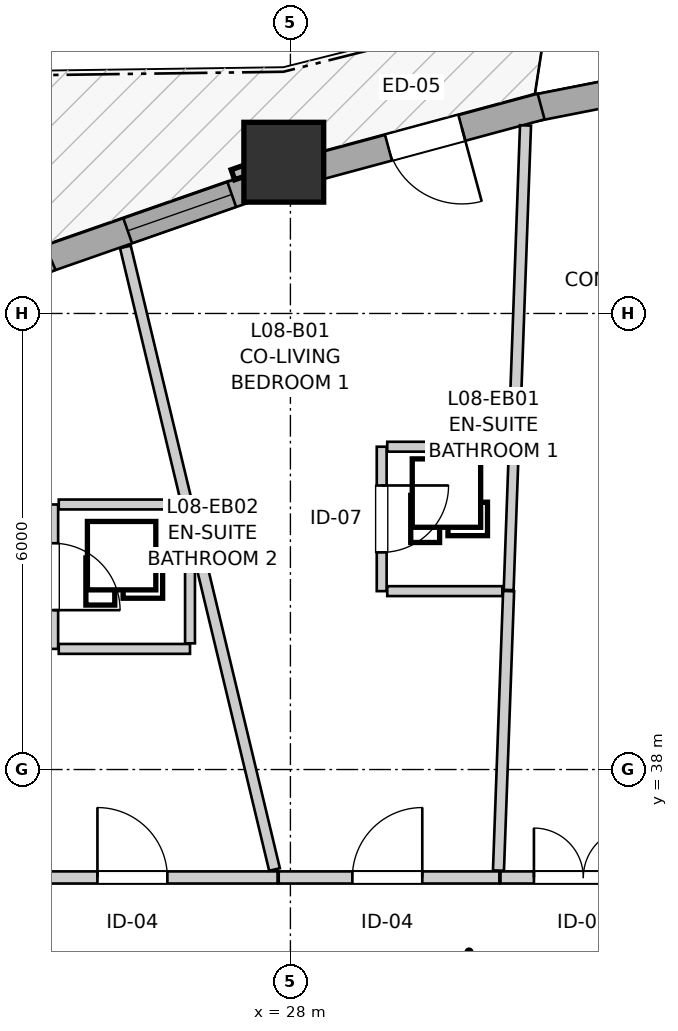
"""IFC4 building model, lengths in metres.
Left out: names, types, materials, properties, quantities, classifications, styles, units other than length and angle.
Written with IfcOpenShell. Run it as: python <this file> out.ifc"""

import sys

from ifc_helpers import new_model, si_unit, direction, frame, frame_2d, origin, origin_2d, place, context, subcontext, project, spatial, rectangle, extrude, source, transform, mapped, element, fill, save


model = new_model("IFC4")
c1 = context("Model", 3, precision=1e-05, world=origin(), true_north=direction((0.0, 1.0)))
c2 = subcontext(c1, "Body", "Model", "MODEL_VIEW")
j1 = project(units=[si_unit("LENGTHUNIT", "METRE"), si_unit("PLANEANGLEUNIT", "RADIAN")], contexts=[c1])
p1 = place(None, origin())
s1 = spatial("IfcSite", under=j1, at=p1, CompositionType="ELEMENT")
p2 = place(p1, origin())
s2 = spatial("IfcBuilding", under=s1, at=p2, CompositionType="ELEMENT")
p3 = place(p2, frame((0.0, 0.0, 30.2)))
s3 = spatial("IfcBuildingStorey", under=s2, at=p3, CompositionType="ELEMENT", Elevation=30.2)
m1 = source(origin(), c2, "Body", "SweptSolid", [
    extrude(rectangle(XDim=1.05, YDim=1.05, at=origin_2d()), origin(), (0.0, 0.0, 1.0), 2.935),
])
p4 = place(p3, frame((27.913, 45.99, 0.0), z_axis=(0.0, 0.0, 1.0), x_axis=(1.0, 0.0, 0.0)))
e1 = element("IfcColumn", 1, at=p4, inside=s3, PredefinedType="COLUMN", context=c2, shape_type="MappedRepresentation", body=[
    mapped(m1, transform((0.0, 0.0, 0.0), x_axis=(1.0, 0.0, 0.0), y_axis=(0.0, 1.0, 0.0), z_axis=(0.0, 0.0, 1.0), scale=1.0)),
])
p5 = place(p3, frame((34.659, 47.38, 0.0), z_axis=(0.0, 0.0, 1.0), x_axis=(-0.981222284826, -0.19288034571, 0.0)))
e2 = element("IfcWall", 2, at=p5, inside=s3, PredefinedType="SOLIDWALL", context=c2, shape_type="SweptSolid", body=[
    extrude(rectangle(XDim=3.512, YDim=0.35, at=frame_2d((1.756, 0.0))), origin(), (0.0, 0.0, 1.0), 2.415),
])
p6 = place(p5, frame((1.021, 0.0, 0.82)))
e3 = element("IfcOpeningElement", 3, at=p6, cuts=e2, PredefinedType="OPENING", context=c2, shape_type="SweptSolid", body=[
    extrude(rectangle(XDim=1.45, YDim=1.25, at=frame_2d((0.725, 0.625))), frame((0.0, 0.185, 0.0), z_axis=(0.0, -1.0, 0.0), x_axis=(1.0, 0.0, 0.0)), (0.0, 0.0, 1.0), 0.37),
])
p7 = place(p3, frame((31.298, 46.722, 0.0), z_axis=(0.0, 0.0, 1.0), x_axis=(-0.965455913242, -0.260566459057, 0.0)))
e4 = element("IfcWall", 4, at=p7, inside=s3, PredefinedType="SOLIDWALL", context=c2, shape_type="SweptSolid", body=[
    extrude(rectangle(XDim=3.159, YDim=0.35, at=frame_2d((1.58, 0.0))), origin(), (0.0, 0.0, 1.0), 2.415),
])
p8 = place(p7, frame((1.08, 0.0, 0.0)))
e5 = element("IfcOpeningElement", 5, at=p8, cuts=e4, PredefinedType="OPENING", context=c2, shape_type="SweptSolid", body=[
    extrude(rectangle(XDim=1.0, YDim=2.1, at=frame_2d((0.5, 1.05))), frame((0.0, 0.185, 0.0), z_axis=(0.0, -1.0, 0.0), x_axis=(1.0, 0.0, 0.0)), (0.0, 0.0, 1.0), 0.37),
])
p9 = place(p3, frame((27.687, 45.726, 0.0), z_axis=(0.0, 0.0, 1.0), x_axis=(-0.9441205041, -0.329600475936, 0.0)))
e6 = element("IfcWall", 6, at=p9, inside=s3, PredefinedType="SOLIDWALL", context=c2, shape_type="SweptSolid", body=[
    extrude(rectangle(XDim=3.104, YDim=0.35, at=frame_2d((1.552, 0.0))), origin(), (0.0, 0.0, 1.0), 2.415),
])
p10 = place(p9, frame((0.486, 0.0, 0.82)))
e7 = element("IfcOpeningElement", 7, at=p10, cuts=e6, PredefinedType="OPENING", context=c2, shape_type="SweptSolid", body=[
    extrude(rectangle(XDim=1.45, YDim=1.25, at=frame_2d((0.725, 0.625))), frame((0.0, 0.185, 0.0), z_axis=(0.0, -1.0, 0.0), x_axis=(1.0, 0.0, 0.0)), (0.0, 0.0, 1.0), 0.37),
])
p11 = place(p3, frame((24.84, 44.735, 0.0), z_axis=(0.0, 0.0, 1.0), x_axis=(-0.917090935142, -0.398678086532, 0.0)))
e8 = element("IfcWall", 8, at=p11, inside=s3, PredefinedType="SOLIDWALL", context=c2, shape_type="SweptSolid", body=[
    extrude(rectangle(XDim=3.346, YDim=0.35, at=frame_2d((1.673, 0.0))), origin(), (0.0, 0.0, 1.0), 2.415),
])
p12 = place(p11, frame((1.108, 0.0, 0.82)))
e9 = element("IfcOpeningElement", 9, at=p12, cuts=e8, PredefinedType="OPENING", context=c2, shape_type="SweptSolid", body=[
    extrude(rectangle(XDim=1.15, YDim=1.2, at=frame_2d((0.575, 0.6))), frame((0.0, 0.185, 0.0), z_axis=(0.0, -1.0, 0.0), x_axis=(1.0, 0.0, 0.0)), (0.0, 0.0, 1.0), 0.37),
])
p13 = place(p3, frame((24.009, 36.58, 0.0), z_axis=(0.0, 0.0, 1.0), x_axis=(1.0, 0.0, 0.0)))
e10 = element("IfcWall", 10, at=p13, inside=s3, PredefinedType="PARTITIONING", context=c2, shape_type="SweptSolid", body=[
    extrude(rectangle(XDim=3.822, YDim=0.16, at=frame_2d((1.911, 0.0))), origin(), (0.0, 0.0, 1.0), 2.543),
])
p14 = place(p13, frame((1.452, 0.0, 0.0)))
e11 = element("IfcOpeningElement", 11, at=p14, cuts=e10, PredefinedType="OPENING", context=c2, shape_type="SweptSolid", body=[
    extrude(rectangle(XDim=0.92, YDim=2.1, at=frame_2d((0.46, 1.05))), frame((0.0, 0.09, 0.0), z_axis=(0.0, -1.0, 0.0), x_axis=(1.0, 0.0, 0.0)), (0.0, 0.0, 1.0), 0.18),
])
p15 = place(p3, frame((27.846, 36.58, 0.0), z_axis=(0.0, 0.0, 1.0), x_axis=(1.0, 0.0, 0.0)))
e12 = element("IfcWall", 12, at=p15, inside=s3, PredefinedType="PARTITIONING", context=c2, shape_type="SweptSolid", body=[
    extrude(rectangle(XDim=2.903, YDim=0.16, at=frame_2d((1.452, 0.0))), origin(), (0.0, 0.0, 1.0), 2.935),
])
p16 = place(p15, frame((0.969, 0.0, 0.0)))
e13 = element("IfcOpeningElement", 13, at=p16, cuts=e12, PredefinedType="OPENING", context=c2, shape_type="SweptSolid", body=[
    extrude(rectangle(XDim=0.92, YDim=2.1, at=frame_2d((0.46, 1.05))), frame((0.0, 0.09, 0.0), z_axis=(0.0, -1.0, 0.0), x_axis=(1.0, 0.0, 0.0)), (0.0, 0.0, 1.0), 0.18),
])
p17 = place(p3, frame((30.764, 36.58, 0.0), z_axis=(0.0, 0.0, 1.0), x_axis=(1.0, 0.0, 0.0)))
e14 = element("IfcWall", 14, at=p17, inside=s3, PredefinedType="PARTITIONING", context=c2, shape_type="SweptSolid", body=[
    extrude(rectangle(XDim=2.225, YDim=0.16, at=frame_2d((1.113, 0.0))), origin(), (0.0, 0.0, 1.0), 2.935),
])
p18 = place(p17, frame((0.44, 0.0, 0.0)))
e15 = element("IfcOpeningElement", 15, at=p18, cuts=e14, PredefinedType="OPENING", context=c2, shape_type="SweptSolid", body=[
    extrude(rectangle(XDim=1.3, YDim=2.1, at=frame_2d((0.65, 1.05))), frame((0.0, 0.09, 0.0), z_axis=(0.0, -1.0, 0.0), x_axis=(1.0, 0.0, 0.0)), (0.0, 0.0, 1.0), 0.18),
])
p19 = place(p3, frame((29.201, 42.247, 0.0), z_axis=(0.0, 0.0, 1.0), x_axis=(0.0, -1.0, 0.0)))
e16 = element("IfcWall", 16, at=p19, inside=s3, PredefinedType="PARTITIONING", context=c2, shape_type="SweptSolid", body=[
    extrude(rectangle(XDim=1.9, YDim=0.13, at=frame_2d((0.95, 0.0))), origin(), (0.0, 0.0, 1.0), 2.935),
])
p20 = place(p19, frame((0.51, 0.0, 0.0)))
e17 = element("IfcOpeningElement", 17, at=p20, cuts=e16, PredefinedType="OPENING", context=c2, shape_type="SweptSolid", body=[
    extrude(rectangle(XDim=0.88, YDim=2.05, at=frame_2d((0.44, 1.025))), frame((0.0, 0.075, 0.0), z_axis=(0.0, -1.0, 0.0), x_axis=(1.0, 0.0, 0.0)), (0.0, 0.0, 1.0), 0.15),
])
p21 = place(p3, frame((24.879, 41.487, 0.0), z_axis=(0.0, 0.0, 1.0), x_axis=(0.0, -1.0, 0.0)))
e18 = element("IfcWall", 18, at=p21, inside=s3, PredefinedType="PARTITIONING", context=c2, shape_type="SweptSolid", body=[
    extrude(rectangle(XDim=1.9, YDim=0.13, at=frame_2d((0.95, 0.0))), origin(), (0.0, 0.0, 1.0), 2.935),
])
p22 = place(p21, frame((0.51, 0.0, 0.0)))
e19 = element("IfcOpeningElement", 19, at=p22, cuts=e18, PredefinedType="OPENING", context=c2, shape_type="SweptSolid", body=[
    extrude(rectangle(XDim=0.88, YDim=2.05, at=frame_2d((0.44, 1.025))), frame((0.0, 0.075, 0.0), z_axis=(0.0, -1.0, 0.0), x_axis=(1.0, 0.0, 0.0)), (0.0, 0.0, 1.0), 0.15),
])
p23 = place(p3, frame((26.664, 41.388, 0.0), z_axis=(0.0, 0.0, 1.0), x_axis=(0.233021630241, -0.972471552201, 0.0)))
e20 = element("IfcWall", 20, at=p23, inside=s3, PredefinedType="PARTITIONING", context=c2, shape_type="SweptSolid", body=[
    extrude(rectangle(XDim=4.836, YDim=0.145, at=frame_2d((2.418, 0.0))), origin(), (0.0, 0.0, 1.0), 2.935),
])
p24 = place(p3, frame((30.94, 42.247, 0.0), z_axis=(0.0, 0.0, 1.0), x_axis=(0.03624948077, 0.999342771597, 0.0)))
e21 = element("IfcWall", 21, at=p24, inside=s3, PredefinedType="PARTITIONING", context=c2, shape_type="SweptSolid", body=[
    extrude(rectangle(XDim=4.229, YDim=0.145, at=frame_2d((2.115, 0.0))), origin(), (0.0, 0.0, 1.0), 2.935),
])
p25 = place(p3, frame((30.737, 36.671, 0.0), z_axis=(0.0, 0.0, 1.0), x_axis=(0.036368539535, 0.999338445839, 0.0)))
e22 = element("IfcWall", 22, at=p25, inside=s3, PredefinedType="PARTITIONING", context=c2, shape_type="SweptSolid", body=[
    extrude(rectangle(XDim=3.679, YDim=0.145, at=frame_2d((1.839, 0.0))), origin(), (0.0, 0.0, 1.0), 2.935),
])
p26 = place(p3, frame((25.829, 44.875, 0.0), z_axis=(0.0, 0.0, 1.0), x_axis=(0.232921769711, -0.972495475154, 0.0)))
e23 = element("IfcWall", 23, at=p26, inside=s3, PredefinedType="PARTITIONING", context=c2, shape_type="SweptSolid", body=[
    extrude(rectangle(XDim=3.5, YDim=0.145, at=frame_2d((1.75, 0.0))), origin(), (0.0, 0.0, 1.0), 2.935),
])
p27 = place(p3, frame((30.872, 40.362, 0.0), z_axis=(0.0, 0.0, 1.0), x_axis=(0.036273279858, 0.999341908042, 0.0)))
e24 = element("IfcWall", 24, at=p27, inside=s3, PredefinedType="PARTITIONING", context=c2, shape_type="SweptSolid", body=[
    extrude(rectangle(XDim=1.871, YDim=0.13, at=frame_2d((0.936, 0.0))), origin(), (0.0, 0.0, 1.0), 2.935),
])
p28 = place(p3, frame((24.952, 39.587, 0.0), z_axis=(0.0, 0.0, 1.0), x_axis=(1.0, 0.0, 0.0)))
e25 = element("IfcWall", 25, at=p28, inside=s3, PredefinedType="PARTITIONING", context=c2, shape_type="SweptSolid", body=[
    extrude(rectangle(XDim=1.727, YDim=0.13, at=frame_2d((0.864, 0.0))), origin(), (0.0, 0.0, 1.0), 2.935),
])
p29 = place(p3, frame((24.952, 41.487, 0.0), z_axis=(0.0, 0.0, 1.0), x_axis=(1.0, 0.0, 0.0)))
e26 = element("IfcWall", 26, at=p29, inside=s3, PredefinedType="PARTITIONING", context=c2, shape_type="SweptSolid", body=[
    extrude(rectangle(XDim=1.59, YDim=0.13, at=frame_2d((0.795, 0.0))), origin(), (0.0, 0.0, 1.0), 2.503),
])
p30 = place(p3, frame((29.274, 42.247, 0.0), z_axis=(0.0, 0.0, 1.0), x_axis=(1.0, 0.0, 0.0)))
e27 = element("IfcWall", 27, at=p30, inside=s3, PredefinedType="PARTITIONING", context=c2, shape_type="SweptSolid", body=[
    extrude(rectangle(XDim=1.583, YDim=0.13, at=frame_2d((0.792, 0.0))), origin(), (0.0, 0.0, 1.0), 2.503),
])
p31 = place(p3, frame((26.679, 39.66, 0.0), z_axis=(0.0, 0.0, 1.0), x_axis=(0.0, 1.0, 0.0)))
e28 = element("IfcWall", 28, at=p31, inside=s3, PredefinedType="PARTITIONING", context=c2, shape_type="SweptSolid", body=[
    extrude(rectangle(XDim=1.38, YDim=0.13, at=frame_2d((0.69, 0.0))), origin(), (0.0, 0.0, 1.0), 2.935),
])
p32 = place(p3, frame((29.274, 40.347, 0.0), z_axis=(0.0, 0.0, 1.0), x_axis=(1.0, 0.0, 0.0)))
e29 = element("IfcWall", 29, at=p32, inside=s3, PredefinedType="PARTITIONING", context=c2, shape_type="SweptSolid", body=[
    extrude(rectangle(XDim=1.514, YDim=0.13, at=frame_2d((0.757, 0.0))), origin(), (0.0, 0.0, 1.0), 2.935),
])
m2 = source(origin(), c2, "Body", "SweptSolid", [
    extrude(rectangle(XDim=1.45, YDim=1.25, at=frame_2d((0.725, 0.625))), frame((0.0, 0.03, 0.0), z_axis=(0.0, -1.0, 0.0), x_axis=(1.0, 0.0, 0.0)), (0.0, 0.0, 1.0), 0.06),
])
p33 = place(p10, origin())
e30 = element("IfcWindow", 30, at=p33, inside=s3, PartitioningType="SINGLE_PANEL", PredefinedType="WINDOW", context=c2, shape_type="MappedRepresentation", body=[
    mapped(m2, transform((0.0, 0.0, 0.0), x_axis=(1.0, 0.0, 0.0), y_axis=(0.0, 1.0, 0.0), z_axis=(0.0, 0.0, 1.0), scale=1.0)),
])
fill(e7, e30)
m3 = source(origin(), c2, "Body", "SweptSolid", [
    extrude(rectangle(XDim=1.0, YDim=2.1, at=frame_2d((0.5, 1.05))), frame((0.0, 0.025, 0.0), z_axis=(0.0, -1.0, 0.0), x_axis=(1.0, 0.0, 0.0)), (0.0, 0.0, 1.0), 0.05),
])
p34 = place(p8, origin())
e31 = element("IfcDoor", 31, at=p34, inside=s3, OperationType="SINGLE_SWING_LEFT", PredefinedType="DOOR", context=c2, shape_type="MappedRepresentation", body=[
    mapped(m3, transform((0.0, 0.0, 0.0), x_axis=(1.0, 0.0, 0.0), y_axis=(0.0, 1.0, 0.0), z_axis=(0.0, 0.0, 1.0), scale=1.0)),
])
fill(e5, e31)
m4 = source(origin(), c2, "Body", "SweptSolid", [
    extrude(rectangle(XDim=0.92, YDim=2.1, at=frame_2d((0.46, 1.05))), frame((0.0, 0.025, 0.0), z_axis=(0.0, -1.0, 0.0), x_axis=(1.0, 0.0, 0.0)), (0.0, 0.0, 1.0), 0.05),
])
p35 = place(p14, origin())
e32 = element("IfcDoor", 32, at=p35, inside=s3, OperationType="SINGLE_SWING_LEFT", PredefinedType="DOOR", context=c2, shape_type="MappedRepresentation", body=[
    mapped(m4, transform((0.0, 0.0, 0.0), x_axis=(1.0, 0.0, 0.0), y_axis=(0.0, 1.0, 0.0), z_axis=(0.0, 0.0, 1.0), scale=1.0)),
])
fill(e11, e32)
p36 = place(p16, origin())
e33 = element("IfcDoor", 33, at=p36, inside=s3, OperationType="SINGLE_SWING_RIGHT", PredefinedType="DOOR", context=c2, shape_type="MappedRepresentation", body=[
    mapped(m4, transform((0.0, 0.0, 0.0), x_axis=(1.0, 0.0, 0.0), y_axis=(0.0, 1.0, 0.0), z_axis=(0.0, 0.0, 1.0), scale=1.0)),
])
fill(e13, e33)
m5 = source(origin(), c2, "Body", "SweptSolid", [
    extrude(rectangle(XDim=1.3, YDim=2.1, at=frame_2d((0.65, 1.05))), frame((0.0, 0.025, 0.0), z_axis=(0.0, -1.0, 0.0), x_axis=(1.0, 0.0, 0.0)), (0.0, 0.0, 1.0), 0.05),
])
p37 = place(p18, origin())
e34 = element("IfcDoor", 34, at=p37, inside=s3, OperationType="DOUBLE_DOOR_SINGLE_SWING", PredefinedType="DOOR", context=c2, shape_type="MappedRepresentation", body=[
    mapped(m5, transform((0.0, 0.0, 0.0), x_axis=(1.0, 0.0, 0.0), y_axis=(0.0, 1.0, 0.0), z_axis=(0.0, 0.0, 1.0), scale=1.0)),
])
fill(e15, e34)
m6 = source(origin(), c2, "Body", "SweptSolid", [
    extrude(rectangle(XDim=0.88, YDim=2.05, at=frame_2d((0.44, 1.025))), frame((0.0, 0.025, 0.0), z_axis=(0.0, -1.0, 0.0), x_axis=(1.0, 0.0, 0.0)), (0.0, 0.0, 1.0), 0.05),
])
p38 = place(p20, origin())
e35 = element("IfcDoor", 35, at=p38, inside=s3, OperationType="SINGLE_SWING_LEFT", PredefinedType="DOOR", context=c2, shape_type="MappedRepresentation", body=[
    mapped(m6, transform((0.0, 0.0, 0.0), x_axis=(1.0, 0.0, 0.0), y_axis=(0.0, 1.0, 0.0), z_axis=(0.0, 0.0, 1.0), scale=1.0)),
])
fill(e17, e35)
p39 = place(p22, origin())
e36 = element("IfcDoor", 36, at=p39, inside=s3, OperationType="SINGLE_SWING_RIGHT", PredefinedType="DOOR", context=c2, shape_type="MappedRepresentation", body=[
    mapped(m6, transform((0.0, 0.0, 0.0), x_axis=(1.0, 0.0, 0.0), y_axis=(0.0, 1.0, 0.0), z_axis=(0.0, 0.0, 1.0), scale=1.0)),
])
fill(e19, e36)
save(model, sys.argv[1])
